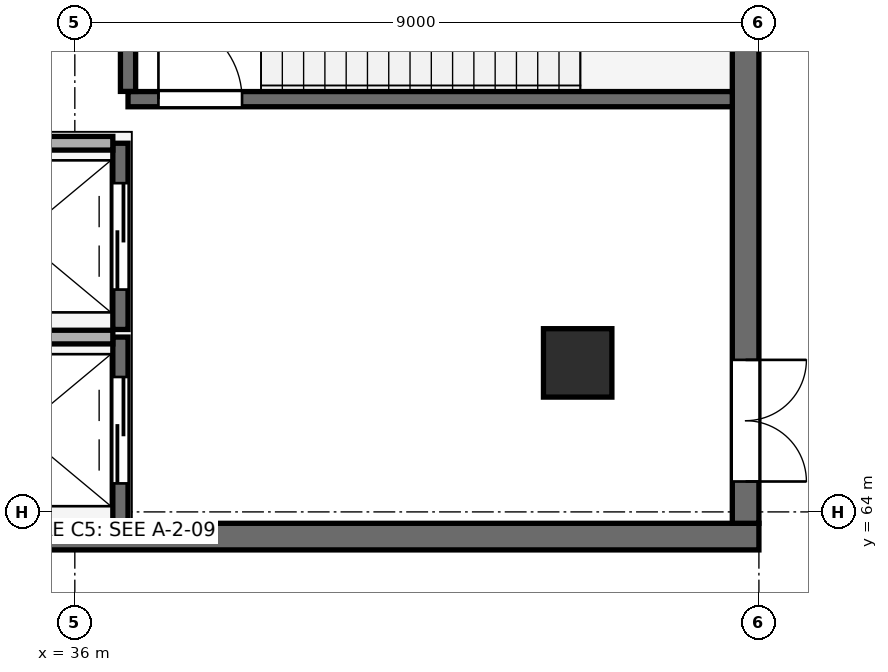
"""IFC4 building model, lengths in metres.
Left out: names, types, materials, properties, quantities, classifications, styles, units other than length and angle.
Written with IfcOpenShell. Run it as: python <this file> out.ifc"""

import sys

from ifc_helpers import new_model, si_unit, direction, frame, frame_2d, origin, origin_2d, place, context, subcontext, project, spatial, rectangle, extrude, element, fill, save


model = new_model("IFC4")
c1 = context("Model", 3, precision=1e-05, world=origin(), true_north=direction((0.0, 1.0)))
c2 = subcontext(c1, "Body", "Model", "MODEL_VIEW")
j1 = project(units=[si_unit("LENGTHUNIT", "METRE"), si_unit("PLANEANGLEUNIT", "RADIAN")], contexts=[c1])
p1 = place(None, origin())
s1 = spatial("IfcSite", under=j1, at=p1, CompositionType="ELEMENT")
p2 = place(p1, origin())
s2 = spatial("IfcBuilding", under=s1, at=p2, CompositionType="ELEMENT")
p3 = place(p2, frame((0.0, 0.0, -5.4)))
s3 = spatial("IfcBuildingStorey", under=s2, at=p3, CompositionType="ELEMENT", Elevation=-5.4)
p4 = place(p3, frame((42.615, 65.96, 0.0), z_axis=(0.0, 0.0, 1.0), x_axis=(1.0, 0.0, 0.0)))
e1 = element("IfcColumn", 1, at=p4, inside=s3, PredefinedType="COLUMN", context=c2, shape_type="SweptSolid", body=[
    extrude(rectangle(XDim=0.9, YDim=0.9, at=origin_2d()), origin(), (0.0, 0.0, 1.0), 5.4),
])
p5 = place(p3, frame((33.6, 63.675, 0.0), z_axis=(0.0, 0.0, 1.0), x_axis=(1.0, 0.0, 0.0)))
e2 = element("IfcWall", 2, at=p5, inside=s3, PredefinedType="SHEAR", context=c2, shape_type="SweptSolid", body=[
    extrude(rectangle(XDim=11.4, YDim=0.35, at=frame_2d((5.7, 0.0))), origin(), (0.0, 0.0, 1.0), 5.4),
])
p6 = place(p3, frame((44.825, 63.85, 0.0), z_axis=(0.0, 0.0, 1.0), x_axis=(0.0, 1.0, 0.0)))
e3 = element("IfcWall", 3, at=p6, inside=s3, PredefinedType="SHEAR", context=c2, shape_type="SweptSolid", body=[
    extrude(rectangle(XDim=9.3, YDim=0.35, at=frame_2d((4.65, 0.0))), origin(), (0.0, 0.0, 1.0), 5.4),
])
p7 = place(p6, frame((0.55, 0.0, 0.0)))
e4 = element("IfcOpeningElement", 4, at=p7, cuts=e3, PredefinedType="OPENING", context=c2, shape_type="SweptSolid", body=[
    extrude(rectangle(XDim=1.6, YDim=2.2, at=frame_2d((0.8, 1.1))), frame((0.0, 0.185, 0.0), z_axis=(0.0, -1.0, 0.0), x_axis=(1.0, 0.0, 0.0)), (0.0, 0.0, 1.0), 0.37),
])
p8 = place(p3, frame((36.6, 63.85, 0.0), z_axis=(0.0, 0.0, 1.0), x_axis=(0.0, 1.0, 0.0)))
e5 = element("IfcWall", 5, at=p8, inside=s3, PredefinedType="SHEAR", context=c2, shape_type="SweptSolid", body=[
    extrude(rectangle(XDim=2.45, YDim=0.2, at=frame_2d((1.225, 0.0))), origin(), (0.0, 0.0, 1.0), 5.04),
])
p9 = place(p8, frame((0.525, 0.0, 0.0)))
e6 = element("IfcOpeningElement", 6, at=p9, cuts=e5, PredefinedType="OPENING", context=c2, shape_type="SweptSolid", body=[
    extrude(rectangle(XDim=1.4, YDim=2.2, at=frame_2d((0.7, 1.1))), frame((0.0, 0.11, 0.0), z_axis=(0.0, -1.0, 0.0), x_axis=(1.0, 0.0, 0.0)), (0.0, 0.0, 1.0), 0.22),
])
p10 = place(p3, frame((34.05, 66.3, 0.0), z_axis=(0.0, 0.0, 1.0), x_axis=(1.0, 0.0, 0.0)))
e7 = element("IfcWall", 7, at=p10, inside=s3, PredefinedType="PARTITIONING", context=c2, shape_type="SweptSolid", body=[
    extrude(rectangle(XDim=2.45, YDim=0.18, at=frame_2d((1.225, 0.0))), origin(), (0.0, 0.0, 1.0), 5.4),
])
p11 = place(p3, frame((36.6, 66.4, 0.0), z_axis=(0.0, 0.0, 1.0), x_axis=(0.0, 1.0, 0.0)))
e8 = element("IfcWall", 8, at=p11, inside=s3, PredefinedType="SHEAR", context=c2, shape_type="SweptSolid", body=[
    extrude(rectangle(XDim=2.45, YDim=0.2, at=frame_2d((1.225, 0.0))), origin(), (0.0, 0.0, 1.0), 5.04),
])
p12 = place(p11, frame((0.525, 0.0, 0.0)))
e9 = element("IfcOpeningElement", 9, at=p12, cuts=e8, PredefinedType="OPENING", context=c2, shape_type="SweptSolid", body=[
    extrude(rectangle(XDim=1.4, YDim=2.2, at=frame_2d((0.7, 1.1))), frame((0.0, 0.11, 0.0), z_axis=(0.0, -1.0, 0.0), x_axis=(1.0, 0.0, 0.0)), (0.0, 0.0, 1.0), 0.22),
])
p13 = place(p3, frame((34.05, 68.85, 0.0), z_axis=(0.0, 0.0, 1.0), x_axis=(1.0, 0.0, 0.0)))
e10 = element("IfcWall", 10, at=p13, inside=s3, PredefinedType="PARTITIONING", context=c2, shape_type="SweptSolid", body=[
    extrude(rectangle(XDim=2.45, YDim=0.18, at=frame_2d((1.225, 0.0))), origin(), (0.0, 0.0, 1.0), 5.4),
])
p14 = place(p3, frame((36.7, 69.43, 0.0), z_axis=(0.0, 0.0, 1.0), x_axis=(1.0, 0.0, 0.0)))
e11 = element("IfcWall", 11, at=p14, inside=s3, PredefinedType="SHEAR", context=c2, shape_type="SweptSolid", body=[
    extrude(rectangle(XDim=7.95, YDim=0.2, at=frame_2d((3.975, 0.0))), origin(), (0.0, 0.0, 1.0), 5.4),
])
p15 = place(p14, frame((0.4, 0.0, 0.0)))
e12 = element("IfcOpeningElement", 12, at=p15, cuts=e11, PredefinedType="OPENING", context=c2, shape_type="SweptSolid", body=[
    extrude(rectangle(XDim=1.1, YDim=2.15, at=frame_2d((0.55, 1.075))), frame((0.0, 0.11, 0.0), z_axis=(0.0, -1.0, 0.0), x_axis=(1.0, 0.0, 0.0)), (0.0, 0.0, 1.0), 0.22),
])
p16 = place(p3, frame((36.7, 69.532, 0.0), z_axis=(0.0, 0.0, 1.0), x_axis=(0.0, 1.0, 0.0)))
e13 = element("IfcWall", 13, at=p16, inside=s3, PredefinedType="SHEAR", context=c2, shape_type="SweptSolid", body=[
    extrude(rectangle(XDim=3.586, YDim=0.2, at=frame_2d((1.793, 0.0))), origin(), (0.0, 0.0, 1.0), 5.4),
])
p17 = place(p9, origin())
e14 = element("IfcDoor", 14, at=p17, inside=s3, OperationType="DOUBLE_DOOR_SLIDING", PredefinedType="DOOR", context=c2, shape_type="SweptSolid", body=[
    extrude(rectangle(XDim=1.4, YDim=2.2, at=frame_2d((0.7, 1.1))), frame((0.0, 0.025, 0.0), z_axis=(0.0, -1.0, 0.0), x_axis=(1.0, 0.0, 0.0)), (0.0, 0.0, 1.0), 0.05),
])
fill(e6, e14)
p18 = place(p12, origin())
e15 = element("IfcDoor", 15, at=p18, inside=s3, OperationType="DOUBLE_DOOR_SLIDING", PredefinedType="DOOR", context=c2, shape_type="SweptSolid", body=[
    extrude(rectangle(XDim=1.4, YDim=2.2, at=frame_2d((0.7, 1.1))), frame((0.0, 0.025, 0.0), z_axis=(0.0, -1.0, 0.0), x_axis=(1.0, 0.0, 0.0)), (0.0, 0.0, 1.0), 0.05),
])
fill(e9, e15)
p19 = place(p15, frame((1.1, 0.0, 0.0), z_axis=(0.0, 0.0, 1.0), x_axis=(-1.0, 0.0, 0.0)))
e16 = element("IfcDoor", 16, at=p19, inside=s3, OperationType="SINGLE_SWING_RIGHT", PredefinedType="DOOR", context=c2, shape_type="SweptSolid", body=[
    extrude(rectangle(XDim=1.1, YDim=2.15, at=frame_2d((0.55, 1.075))), frame((0.0, 0.025, 0.0), z_axis=(0.0, -1.0, 0.0), x_axis=(1.0, 0.0, 0.0)), (0.0, 0.0, 1.0), 0.05),
])
fill(e12, e16)
p20 = place(p7, frame((1.6, 0.0, 0.0), z_axis=(0.0, 0.0, 1.0), x_axis=(-1.0, 0.0, 0.0)))
e17 = element("IfcDoor", 17, at=p20, inside=s3, OperationType="DOUBLE_DOOR_SINGLE_SWING", PredefinedType="DOOR", context=c2, shape_type="SweptSolid", body=[
    extrude(rectangle(XDim=1.6, YDim=2.2, at=frame_2d((0.8, 1.1))), frame((0.0, 0.025, 0.0), z_axis=(0.0, -1.0, 0.0), x_axis=(1.0, 0.0, 0.0)), (0.0, 0.0, 1.0), 0.05),
])
fill(e4, e17)
save(model, sys.argv[1])
